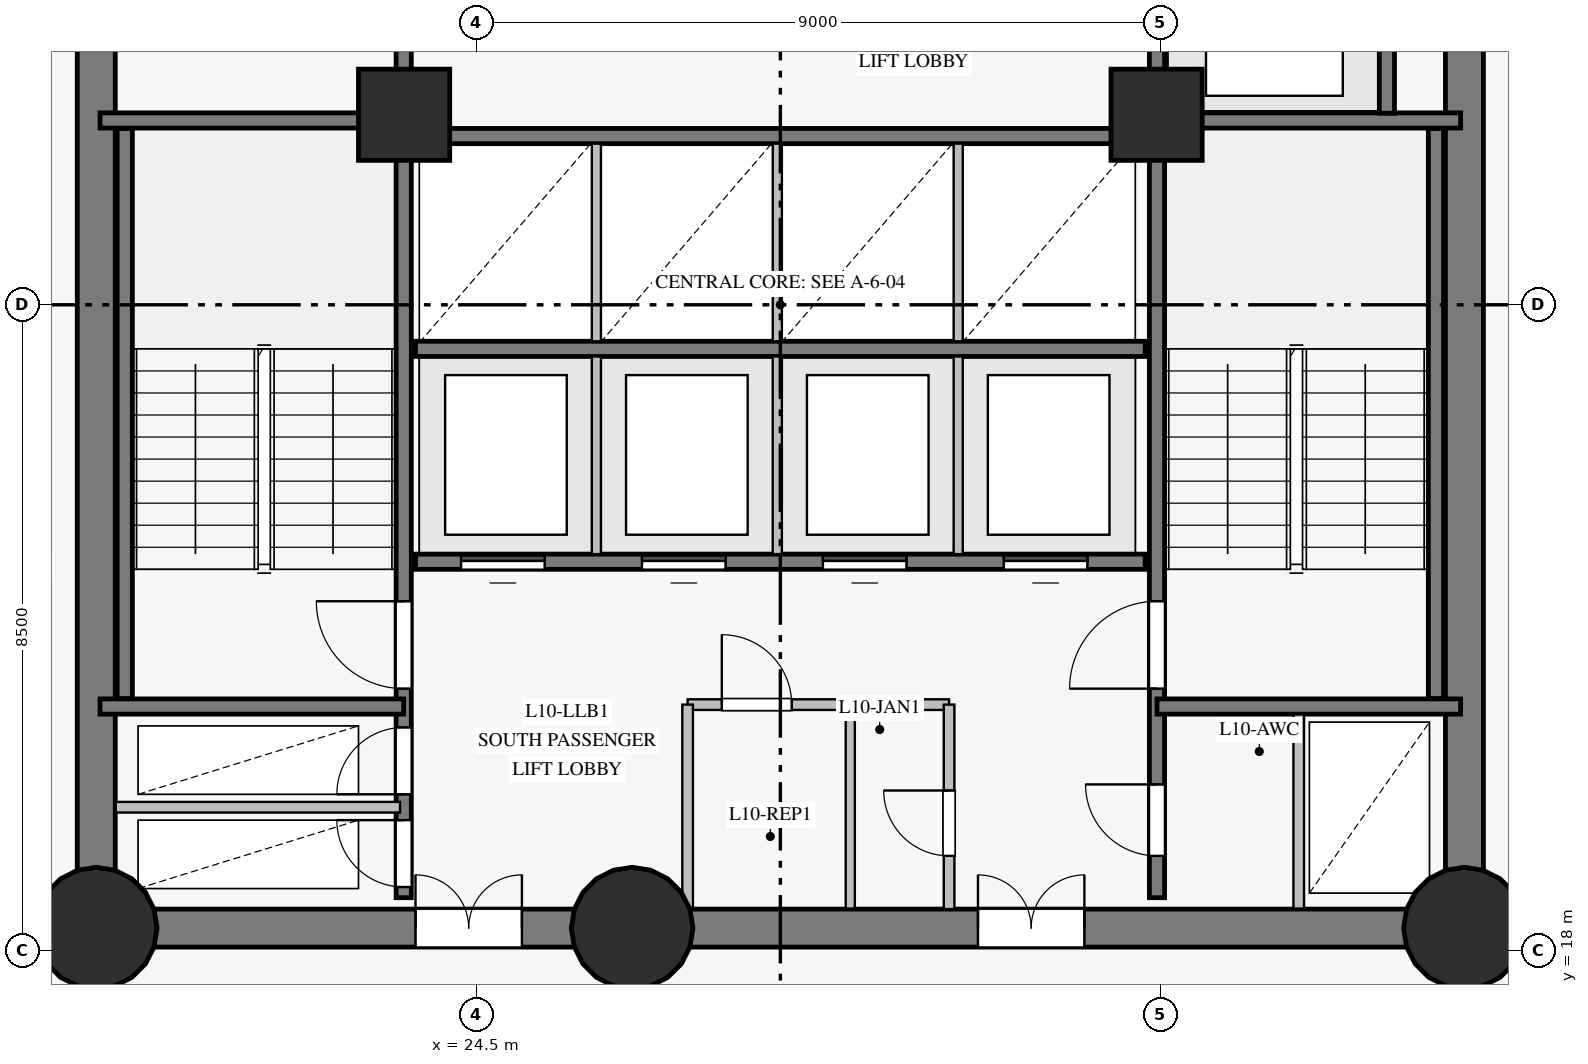
"""IFC4 building model, lengths in metres.
Left out: names, types, materials, properties, quantities, classifications, styles, units other than length and angle.
Written with IfcOpenShell. Run it as: python <this file> out.ifc"""

import sys

from ifc_helpers import new_model, si_unit, direction, frame, frame_2d, origin, origin_with_axes, origin_2d, place, context, subcontext, project, spatial, rectangle, circle, extrude, source, transform, mapped, element, fill, save


model = new_model("IFC4")
c1 = context("Model", 3, precision=1e-05, world=origin(), true_north=direction((0.0, 1.0)))
c2 = subcontext(c1, "Body", "Model", "MODEL_VIEW")
j1 = project(units=[si_unit("LENGTHUNIT", "METRE"), si_unit("PLANEANGLEUNIT", "RADIAN")], contexts=[c1])
p1 = place(None, origin())
s1 = spatial("IfcSite", under=j1, at=p1, CompositionType="ELEMENT")
p2 = place(p1, origin())
s2 = spatial("IfcBuilding", under=s1, at=p2, CompositionType="ELEMENT")
p3 = place(p2, frame((0.0, 0.0, 40.9)))
s3 = spatial("IfcBuildingStorey", under=s2, at=p3, CompositionType="ELEMENT", Elevation=40.9)
p4 = place(p3, frame((19.5, 18.3, 0.0), z_axis=(0.0, 0.0, 1.0), x_axis=(1.0, 0.0, 0.0)))
e1 = element("IfcWall", 1, at=p4, inside=s3, PredefinedType="SHEAR", context=c2, shape_type="SweptSolid", body=[
    extrude(rectangle(XDim=7.05, YDim=0.5, at=frame_2d((3.525, 0.0))), origin(), (0.0, 0.0, 1.0), 3.35),
])
p5 = place(p4, frame((4.2, 0.0, 0.0)))
e2 = element("IfcOpeningElement", 2, at=p5, cuts=e1, PredefinedType="OPENING", context=c2, shape_type="SweptSolid", body=[
    extrude(rectangle(XDim=1.4, YDim=2.2, at=frame_2d((0.7, 1.1))), frame((0.0, 0.26, 0.0), z_axis=(0.0, -1.0, 0.0), x_axis=(1.0, 0.0, 0.0)), (0.0, 0.0, 1.0), 0.52),
])
p6 = place(p3, frame((26.55, 18.3, 0.0), z_axis=(0.0, 0.0, 1.0), x_axis=(1.0, 0.0, 0.0)))
e3 = element("IfcWall", 3, at=p6, inside=s3, PredefinedType="SHEAR", context=c2, shape_type="SweptSolid", body=[
    extrude(rectangle(XDim=10.95, YDim=0.5, at=frame_2d((5.475, 0.0))), origin(), (0.0, 0.0, 1.0), 3.35),
])
p7 = place(p6, frame((4.55, 0.0, 0.0)))
e4 = element("IfcOpeningElement", 4, at=p7, cuts=e3, PredefinedType="OPENING", context=c2, shape_type="SweptSolid", body=[
    extrude(rectangle(XDim=1.4, YDim=2.2, at=frame_2d((0.7, 1.1))), frame((0.0, 0.26, 0.0), z_axis=(0.0, -1.0, 0.0), x_axis=(1.0, 0.0, 0.0)), (0.0, 0.0, 1.0), 0.52),
])
p8 = place(p3, frame((37.5, 18.3, 0.0), z_axis=(0.0, 0.0, 1.0), x_axis=(0.0, 1.0, 0.0)))
e5 = element("IfcWall", 5, at=p8, inside=s3, PredefinedType="SHEAR", context=c2, shape_type="SweptSolid", body=[
    extrude(rectangle(XDim=16.4, YDim=0.5, at=frame_2d((8.2, 0.0))), origin(), (0.0, 0.0, 1.0), 3.35),
])
p9 = place(p8, frame((14.06, 0.0, 0.0)))
e6 = element("IfcOpeningElement", 6, at=p9, cuts=e5, PredefinedType="OPENING", context=c2, shape_type="SweptSolid", body=[
    extrude(rectangle(XDim=1.2, YDim=2.15, at=frame_2d((0.6, 1.075))), frame((0.0, 0.26, 0.0), z_axis=(0.0, -1.0, 0.0), x_axis=(1.0, 0.0, 0.0)), (0.0, 0.0, 1.0), 0.52),
])
p10 = place(p3, frame((19.5, 34.7, 0.0), z_axis=(0.0, 0.0, 1.0), x_axis=(0.0, -1.0, 0.0)))
e7 = element("IfcWall", 7, at=p10, inside=s3, PredefinedType="SHEAR", context=c2, shape_type="SweptSolid", body=[
    extrude(rectangle(XDim=16.4, YDim=0.5, at=frame_2d((8.2, 0.0))), origin(), (0.0, 0.0, 1.0), 3.35),
])
p11 = place(p10, frame((3.1, 0.0, 0.0)))
e8 = element("IfcOpeningElement", 8, at=p11, cuts=e7, PredefinedType="OPENING", context=c2, shape_type="SweptSolid", body=[
    extrude(rectangle(XDim=1.1, YDim=2.15, at=frame_2d((0.55, 1.075))), frame((0.0, 0.26, 0.0), z_axis=(0.0, -1.0, 0.0), x_axis=(1.0, 0.0, 0.0)), (0.0, 0.0, 1.0), 0.52),
])
m1 = source(origin_with_axes(), c2, "Body", "SweptSolid", [
    extrude(circle(Radius=0.8, at=origin_2d()), origin(), (0.0, 0.0, 1.0), 3.6),
])
for number, where, z_axis, x_axis in (
    (9, (19.5, 18.3, 0.0), (0.0, 0.0, 1.0), (1.0, 0.0, 0.0)),
    (10, (26.55, 18.3, 0.0), (0.0, 0.0, 1.0), (1.0, 0.0, 0.0)),
    (11, (37.5, 18.3, 0.0), (0.0, 0.0, 1.0), (1.0, 0.0, 0.0)),
):
    element("IfcColumn", number, at=place(p3, frame(where, z_axis=z_axis, x_axis=x_axis)), inside=s3, PredefinedType="COLUMN", context=c2, shape_type="MappedRepresentation", body=[
        mapped(m1, transform((0.0, 0.0, 0.0), scale=1.0)),
    ])
m2 = source(origin_with_axes(), c2, "Body", "SweptSolid", [
    extrude(rectangle(XDim=1.2, YDim=1.2, at=origin_2d()), origin(), (0.0, 0.0, 1.0), 3.6),
])
for number, where, z_axis, x_axis in (
    (12, (23.55, 29.0, 0.0), (0.0, 0.0, 1.0), (1.0, 0.0, 0.0)),
    (13, (33.45, 29.0, 0.0), (0.0, 0.0, 1.0), (1.0, 0.0, 0.0)),
):
    element("IfcColumn", number, at=place(p3, frame(where, z_axis=z_axis, x_axis=x_axis)), inside=s3, PredefinedType="COLUMN", context=c2, shape_type="MappedRepresentation", body=[
        mapped(m2, transform((0.0, 0.0, 0.0), scale=1.0)),
    ])
p12 = place(p3, frame((23.545, 18.7, 0.0), z_axis=(0.0, 0.0, 1.0), x_axis=(0.0, 1.0, 0.0)))
e14 = element("IfcWall", 14, at=p12, inside=s3, PredefinedType="SHEAR", context=c2, shape_type="SweptSolid", body=[
    extrude(rectangle(XDim=15.6, YDim=0.2, at=frame_2d((7.8, 0.0))), origin(), (0.0, 0.0, 1.0), 3.35),
])
p13 = place(p12, frame((2.75, 0.0, 0.0)))
e15 = element("IfcOpeningElement", 15, at=p13, cuts=e14, PredefinedType="OPENING", context=c2, shape_type="SweptSolid", body=[
    extrude(rectangle(XDim=1.15, YDim=2.15, at=frame_2d((0.575, 1.075))), frame((0.0, 0.11, 0.0), z_axis=(0.0, -1.0, 0.0), x_axis=(1.0, 0.0, 0.0)), (0.0, 0.0, 1.0), 0.22),
])
p14 = place(p12, frame((0.14, 0.0, 0.0)))
e16 = element("IfcOpeningElement", 16, at=p14, cuts=e14, PredefinedType="OPENING", context=c2, shape_type="SweptSolid", body=[
    extrude(rectangle(XDim=0.88, YDim=2.1, at=frame_2d((0.44, 1.05))), frame((0.0, 0.11, 0.0), z_axis=(0.0, -1.0, 0.0), x_axis=(1.0, 0.0, 0.0)), (0.0, 0.0, 1.0), 0.22),
])
p15 = place(p12, frame((1.36, 0.0, 0.0)))
e17 = element("IfcOpeningElement", 17, at=p15, cuts=e14, PredefinedType="OPENING", context=c2, shape_type="SweptSolid", body=[
    extrude(rectangle(XDim=0.88, YDim=2.1, at=frame_2d((0.44, 1.05))), frame((0.0, 0.11, 0.0), z_axis=(0.0, -1.0, 0.0), x_axis=(1.0, 0.0, 0.0)), (0.0, 0.0, 1.0), 0.22),
])
p16 = place(p12, frame((12.1, 0.0, 0.0)))
e18 = element("IfcOpeningElement", 18, at=p16, cuts=e14, PredefinedType="OPENING", context=c2, shape_type="SweptSolid", body=[
    extrude(rectangle(XDim=1.12, YDim=2.15, at=frame_2d((0.56, 1.075))), frame((0.0, 0.11, 0.0), z_axis=(0.0, -1.0, 0.0), x_axis=(1.0, 0.0, 0.0)), (0.0, 0.0, 1.0), 0.22),
])
p17 = place(p12, frame((14.05, 0.0, 0.0)))
e19 = element("IfcOpeningElement", 19, at=p17, cuts=e14, PredefinedType="OPENING", context=c2, shape_type="SweptSolid", body=[
    extrude(rectangle(XDim=1.12, YDim=2.15, at=frame_2d((0.56, 1.075))), frame((0.0, 0.11, 0.0), z_axis=(0.0, -1.0, 0.0), x_axis=(1.0, 0.0, 0.0)), (0.0, 0.0, 1.0), 0.22),
])
p18 = place(p3, frame((33.455, 18.7, 0.0), z_axis=(0.0, 0.0, 1.0), x_axis=(0.0, 1.0, 0.0)))
e20 = element("IfcWall", 20, at=p18, inside=s3, PredefinedType="SHEAR", context=c2, shape_type="SweptSolid", body=[
    extrude(rectangle(XDim=15.6, YDim=0.2, at=frame_2d((7.8, 0.0))), origin(), (0.0, 0.0, 1.0), 3.35),
])
p19 = place(p18, frame((2.75, 0.0, 0.0)))
e21 = element("IfcOpeningElement", 21, at=p19, cuts=e20, PredefinedType="OPENING", context=c2, shape_type="SweptSolid", body=[
    extrude(rectangle(XDim=1.15, YDim=2.15, at=frame_2d((0.575, 1.075))), frame((0.0, 0.11, 0.0), z_axis=(0.0, -1.0, 0.0), x_axis=(1.0, 0.0, 0.0)), (0.0, 0.0, 1.0), 0.22),
])
p20 = place(p18, frame((0.55, 0.0, 0.0)))
e22 = element("IfcOpeningElement", 22, at=p20, cuts=e20, PredefinedType="OPENING", context=c2, shape_type="SweptSolid", body=[
    extrude(rectangle(XDim=0.94, YDim=2.1, at=frame_2d((0.47, 1.05))), frame((0.0, 0.11, 0.0), z_axis=(0.0, -1.0, 0.0), x_axis=(1.0, 0.0, 0.0)), (0.0, 0.0, 1.0), 0.22),
])
p21 = place(p3, frame((23.7, 23.12, 0.0), z_axis=(0.0, 0.0, 1.0), x_axis=(1.0, 0.0, 0.0)))
e23 = element("IfcWall", 23, at=p21, inside=s3, PredefinedType="SHEAR", context=c2, shape_type="SweptSolid", body=[
    extrude(rectangle(XDim=9.6, YDim=0.2, at=frame_2d((4.8, 0.0))), origin(), (0.0, 0.0, 1.0), 3.35),
])
p22 = place(p21, frame((0.6, 0.0, 0.0)))
e24 = element("IfcOpeningElement", 24, at=p22, cuts=e23, PredefinedType="OPENING", context=c2, shape_type="SweptSolid", body=[
    extrude(rectangle(XDim=1.1, YDim=2.15, at=frame_2d((0.55, 1.075))), frame((0.0, 0.11, 0.0), z_axis=(0.0, -1.0, 0.0), x_axis=(1.0, 0.0, 0.0)), (0.0, 0.0, 1.0), 0.22),
])
p23 = place(p21, frame((2.98, 0.0, 0.0)))
e25 = element("IfcOpeningElement", 25, at=p23, cuts=e23, PredefinedType="OPENING", context=c2, shape_type="SweptSolid", body=[
    extrude(rectangle(XDim=1.1, YDim=2.15, at=frame_2d((0.55, 1.075))), frame((0.0, 0.11, 0.0), z_axis=(0.0, -1.0, 0.0), x_axis=(1.0, 0.0, 0.0)), (0.0, 0.0, 1.0), 0.22),
])
p24 = place(p21, frame((5.36, 0.0, 0.0)))
e26 = element("IfcOpeningElement", 26, at=p24, cuts=e23, PredefinedType="OPENING", context=c2, shape_type="SweptSolid", body=[
    extrude(rectangle(XDim=1.1, YDim=2.15, at=frame_2d((0.55, 1.075))), frame((0.0, 0.11, 0.0), z_axis=(0.0, -1.0, 0.0), x_axis=(1.0, 0.0, 0.0)), (0.0, 0.0, 1.0), 0.22),
])
p25 = place(p21, frame((7.74, 0.0, 0.0)))
e27 = element("IfcOpeningElement", 27, at=p25, cuts=e23, PredefinedType="OPENING", context=c2, shape_type="SweptSolid", body=[
    extrude(rectangle(XDim=1.1, YDim=2.15, at=frame_2d((0.55, 1.075))), frame((0.0, 0.11, 0.0), z_axis=(0.0, -1.0, 0.0), x_axis=(1.0, 0.0, 0.0)), (0.0, 0.0, 1.0), 0.22),
])
for number, where, z_axis, x_axis in (
    (28, (23.7, 25.92, 0.0), (0.0, 0.0, 1.0), (1.0, 0.0, 0.0)),
    (29, (23.7, 28.72, 0.0), (0.0, 0.0, 1.0), (1.0, 0.0, 0.0)),
):
    element("IfcWall", number, at=place(p3, frame(where, z_axis=z_axis, x_axis=x_axis)), inside=s3, PredefinedType="SHEAR", context=c2, shape_type="SweptSolid", body=[
        extrude(rectangle(XDim=9.6, YDim=0.2, at=frame_2d((4.8, 0.0))), origin(), (0.0, 0.0, 1.0), 3.35),
    ])
for number, where, z_axis, x_axis in (
    (30, (19.875, 21.32, 0.0), (0.0, 0.0, 1.0), (0.0, 1.0, 0.0)),
    (31, (37.125, 21.32, 0.0), (0.0, 0.0, 1.0), (0.0, 1.0, 0.0)),
):
    element("IfcWall", number, at=place(p3, frame(where, z_axis=z_axis, x_axis=x_axis)), inside=s3, PredefinedType="SHEAR", context=c2, shape_type="SweptSolid", body=[
        extrude(rectangle(XDim=7.5, YDim=0.2, at=frame_2d((3.75, 0.0))), origin(), (0.0, 0.0, 1.0), 3.35),
    ])
for number, where, z_axis, x_axis in (
    (32, (33.455, 21.215, 0.0), (0.0, 0.0, 1.0), (1.0, 0.0, 0.0)),
    (33, (33.455, 28.925, 0.0), (0.0, 0.0, 1.0), (1.0, 0.0, 0.0)),
    (34, (19.55, 21.215, 0.0), (0.0, 0.0, 1.0), (1.0, 0.0, 0.0)),
    (35, (19.55, 28.925, 0.0), (0.0, 0.0, 1.0), (1.0, 0.0, 0.0)),
):
    element("IfcWall", number, at=place(p3, frame(where, z_axis=z_axis, x_axis=x_axis)), inside=s3, PredefinedType="SHEAR", context=c2, shape_type="SweptSolid", body=[
        extrude(rectangle(XDim=3.995, YDim=0.2, at=frame_2d((1.998, 0.0))), origin(), (0.0, 0.0, 1.0), 3.35),
    ])
p26 = place(p3, frame((36.48, 29.02, 0.0), z_axis=(0.0, 0.0, 1.0), x_axis=(0.0, 1.0, 0.0)))
e36 = element("IfcWall", 36, at=p26, inside=s3, PredefinedType="SHEAR", context=c2, shape_type="SweptSolid", body=[
    extrude(rectangle(XDim=2.86, YDim=0.2, at=frame_2d((1.43, 0.0))), origin(), (0.0, 0.0, 1.0), 3.35),
])
p27 = place(p3, frame((19.757, 19.89, 0.0), z_axis=(0.0, 0.0, 1.0), x_axis=(1.0, 0.0, 0.0)))
e37 = element("IfcWall", 37, at=p27, inside=s3, PredefinedType="PARTITIONING", context=c2, shape_type="SweptSolid", body=[
    extrude(rectangle(XDim=3.739, YDim=0.14, at=frame_2d((1.87, 0.0))), origin(), (0.0, 0.0, 1.0), 3.35),
])
p28 = place(p3, frame((27.28, 21.24, 0.0), z_axis=(0.0, 0.0, 1.0), x_axis=(1.0, 0.0, 0.0)))
e38 = element("IfcWall", 38, at=p28, inside=s3, PredefinedType="PARTITIONING", context=c2, shape_type="SweptSolid", body=[
    extrude(rectangle(XDim=3.44, YDim=0.14, at=frame_2d((1.72, 0.0))), origin(), (0.0, 0.0, 1.0), 3.35),
])
p29 = place(p28, frame((0.45, 0.0, 0.0)))
e39 = element("IfcOpeningElement", 39, at=p29, cuts=e38, PredefinedType="OPENING", context=c2, shape_type="SweptSolid", body=[
    extrude(rectangle(XDim=0.92, YDim=2.1, at=frame_2d((0.46, 1.05))), frame((0.0, 0.08, 0.0), z_axis=(0.0, -1.0, 0.0), x_axis=(1.0, 0.0, 0.0)), (0.0, 0.0, 1.0), 0.16),
])
p30 = place(p3, frame((27.28, 18.55, 0.0), z_axis=(0.0, 0.0, 1.0), x_axis=(0.0, 1.0, 0.0)))
e40 = element("IfcWall", 40, at=p30, inside=s3, PredefinedType="PARTITIONING", context=c2, shape_type="SweptSolid", body=[
    extrude(rectangle(XDim=2.69, YDim=0.14, at=frame_2d((1.345, 0.0))), origin(), (0.0, 0.0, 1.0), 3.35),
])
p31 = place(p3, frame((30.72, 18.55, 0.0), z_axis=(0.0, 0.0, 1.0), x_axis=(0.0, 1.0, 0.0)))
e41 = element("IfcWall", 41, at=p31, inside=s3, PredefinedType="PARTITIONING", context=c2, shape_type="SweptSolid", body=[
    extrude(rectangle(XDim=2.69, YDim=0.14, at=frame_2d((1.345, 0.0))), origin(), (0.0, 0.0, 1.0), 3.35),
])
p32 = place(p31, frame((0.7, 0.0, 0.0)))
e42 = element("IfcOpeningElement", 42, at=p32, cuts=e41, PredefinedType="OPENING", context=c2, shape_type="SweptSolid", body=[
    extrude(rectangle(XDim=0.86, YDim=2.1, at=frame_2d((0.43, 1.05))), frame((0.0, 0.08, 0.0), z_axis=(0.0, -1.0, 0.0), x_axis=(1.0, 0.0, 0.0)), (0.0, 0.0, 1.0), 0.16),
])
for number, where, z_axis, x_axis in (
    (43, (26.08, 23.22, 0.0), (0.0, 0.0, 1.0), (0.0, 1.0, 0.0)),
    (44, (28.46, 23.22, 0.0), (0.0, 0.0, 1.0), (0.0, 1.0, 0.0)),
    (45, (30.84, 23.22, 0.0), (0.0, 0.0, 1.0), (0.0, 1.0, 0.0)),
    (46, (26.08, 26.02, 0.0), (0.0, 0.0, 1.0), (0.0, 1.0, 0.0)),
    (47, (28.46, 26.02, 0.0), (0.0, 0.0, 1.0), (0.0, 1.0, 0.0)),
    (48, (30.84, 26.02, 0.0), (0.0, 0.0, 1.0), (0.0, 1.0, 0.0)),
):
    element("IfcWall", number, at=place(p3, frame(where, z_axis=z_axis, x_axis=x_axis)), inside=s3, PredefinedType="PARTITIONING", context=c2, shape_type="SweptSolid", body=[
        extrude(rectangle(XDim=2.6, YDim=0.12, at=frame_2d((1.3, 0.0))), origin(), (0.0, 0.0, 1.0), 3.35),
    ])
p33 = place(p3, frame((29.42, 18.557, 0.0), z_axis=(0.0, 0.0, 1.0), x_axis=(0.0, 1.0, 0.0)))
e49 = element("IfcWall", 49, at=p33, inside=s3, PredefinedType="PARTITIONING", context=c2, shape_type="SweptSolid", body=[
    extrude(rectangle(XDim=2.611, YDim=0.12, at=frame_2d((1.306, 0.0))), origin(), (0.0, 0.0, 1.0), 3.35),
])
p34 = place(p3, frame((35.32, 18.557, 0.0), z_axis=(0.0, 0.0, 1.0), x_axis=(0.0, 1.0, 0.0)))
e50 = element("IfcWall", 50, at=p34, inside=s3, PredefinedType="PARTITIONING", context=c2, shape_type="SweptSolid", body=[
    extrude(rectangle(XDim=2.553, YDim=0.14, at=frame_2d((1.277, 0.0))), origin(), (0.0, 0.0, 1.0), 3.35),
])
m3 = source(origin_with_axes(), c2, "Body", "SweptSolid", [
    extrude(rectangle(XDim=1.15, YDim=2.15, at=frame_2d((0.575, 1.075))), frame((0.0, 0.025, 0.0), z_axis=(0.0, -1.0, 0.0), x_axis=(1.0, 0.0, 0.0)), (0.0, 0.0, 1.0), 0.05),
])
p35 = place(p13, origin())
e51 = element("IfcDoor", 51, at=p35, inside=s3, OperationType="SINGLE_SWING_RIGHT", PredefinedType="DOOR", context=c2, shape_type="MappedRepresentation", body=[
    mapped(m3, transform((0.0, 0.0, 0.0), scale=1.0)),
])
fill(e15, e51)
p36 = place(p19, origin())
e52 = element("IfcDoor", 52, at=p36, inside=s3, OperationType="SINGLE_SWING_LEFT", PredefinedType="DOOR", context=c2, shape_type="MappedRepresentation", body=[
    mapped(m3, transform((0.0, 0.0, 0.0), scale=1.0)),
])
fill(e21, e52)
m4 = source(origin_with_axes(), c2, "Body", "SweptSolid", [
    extrude(rectangle(XDim=0.88, YDim=2.1, at=frame_2d((0.44, 1.05))), frame((0.0, 0.025, 0.0), z_axis=(0.0, -1.0, 0.0), x_axis=(1.0, 0.0, 0.0)), (0.0, 0.0, 1.0), 0.05),
])
p37 = place(p14, origin())
e53 = element("IfcDoor", 53, at=p37, inside=s3, OperationType="SINGLE_SWING_RIGHT", PredefinedType="DOOR", context=c2, shape_type="MappedRepresentation", body=[
    mapped(m4, transform((0.0, 0.0, 0.0), scale=1.0)),
])
fill(e16, e53)
p38 = place(p15, origin())
e54 = element("IfcDoor", 54, at=p38, inside=s3, OperationType="SINGLE_SWING_LEFT", PredefinedType="DOOR", context=c2, shape_type="MappedRepresentation", body=[
    mapped(m4, transform((0.0, 0.0, 0.0), scale=1.0)),
])
fill(e17, e54)
m5 = source(origin_with_axes(), c2, "Body", "SweptSolid", [
    extrude(rectangle(XDim=1.4, YDim=2.2, at=frame_2d((0.7, 1.1))), frame((0.0, 0.025, 0.0), z_axis=(0.0, -1.0, 0.0), x_axis=(1.0, 0.0, 0.0)), (0.0, 0.0, 1.0), 0.05),
])
p39 = place(p5, origin())
e55 = element("IfcDoor", 55, at=p39, inside=s3, OperationType="DOUBLE_DOOR_SINGLE_SWING", PredefinedType="DOOR", context=c2, shape_type="MappedRepresentation", body=[
    mapped(m5, transform((0.0, 0.0, 0.0), scale=1.0)),
])
fill(e2, e55)
p40 = place(p7, origin())
e56 = element("IfcDoor", 56, at=p40, inside=s3, OperationType="DOUBLE_DOOR_SINGLE_SWING", PredefinedType="DOOR", context=c2, shape_type="MappedRepresentation", body=[
    mapped(m5, transform((0.0, 0.0, 0.0), scale=1.0)),
])
fill(e4, e56)
m6 = source(origin_with_axes(), c2, "Body", "SweptSolid", [
    extrude(rectangle(XDim=0.94, YDim=2.1, at=frame_2d((0.47, 1.05))), frame((0.0, 0.025, 0.0), z_axis=(0.0, -1.0, 0.0), x_axis=(1.0, 0.0, 0.0)), (0.0, 0.0, 1.0), 0.05),
])
p41 = place(p20, origin())
e57 = element("IfcDoor", 57, at=p41, inside=s3, OperationType="SINGLE_SWING_RIGHT", PredefinedType="DOOR", context=c2, shape_type="MappedRepresentation", body=[
    mapped(m6, transform((0.0, 0.0, 0.0), scale=1.0)),
])
fill(e22, e57)
m7 = source(origin_with_axes(), c2, "Body", "SweptSolid", [
    extrude(rectangle(XDim=0.92, YDim=2.1, at=frame_2d((0.46, 1.05))), frame((0.0, 0.025, 0.0), z_axis=(0.0, -1.0, 0.0), x_axis=(1.0, 0.0, 0.0)), (0.0, 0.0, 1.0), 0.05),
])
p42 = place(p29, origin())
e58 = element("IfcDoor", 58, at=p42, inside=s3, OperationType="SINGLE_SWING_LEFT", PredefinedType="DOOR", context=c2, shape_type="MappedRepresentation", body=[
    mapped(m7, transform((0.0, 0.0, 0.0), scale=1.0)),
])
fill(e39, e58)
m8 = source(origin_with_axes(), c2, "Body", "SweptSolid", [
    extrude(rectangle(XDim=0.86, YDim=2.1, at=frame_2d((0.43, 1.05))), frame((0.0, 0.025, 0.0), z_axis=(0.0, -1.0, 0.0), x_axis=(1.0, 0.0, 0.0)), (0.0, 0.0, 1.0), 0.05),
])
p43 = place(p32, origin())
e59 = element("IfcDoor", 59, at=p43, inside=s3, OperationType="SINGLE_SWING_RIGHT", PredefinedType="DOOR", context=c2, shape_type="MappedRepresentation", body=[
    mapped(m8, transform((0.0, 0.0, 0.0), scale=1.0)),
])
fill(e42, e59)
m9 = source(origin_with_axes(), c2, "Body", "SweptSolid", [
    extrude(rectangle(XDim=1.1, YDim=2.15, at=frame_2d((0.55, 1.075))), frame((0.0, 0.025, 0.0), z_axis=(0.0, -1.0, 0.0), x_axis=(1.0, 0.0, 0.0)), (0.0, 0.0, 1.0), 0.05),
])
p44 = place(p22, origin())
e60 = element("IfcDoor", 60, at=p44, inside=s3, OperationType="SLIDING_TO_LEFT", PredefinedType="DOOR", context=c2, shape_type="MappedRepresentation", body=[
    mapped(m9, transform((0.0, 0.0, 0.0), scale=1.0)),
])
fill(e24, e60)
p45 = place(p23, origin())
e61 = element("IfcDoor", 61, at=p45, inside=s3, OperationType="SLIDING_TO_RIGHT", PredefinedType="DOOR", context=c2, shape_type="MappedRepresentation", body=[
    mapped(m9, transform((0.0, 0.0, 0.0), scale=1.0)),
])
fill(e25, e61)
p46 = place(p24, origin())
e62 = element("IfcDoor", 62, at=p46, inside=s3, OperationType="SLIDING_TO_LEFT", PredefinedType="DOOR", context=c2, shape_type="MappedRepresentation", body=[
    mapped(m9, transform((0.0, 0.0, 0.0), scale=1.0)),
])
fill(e26, e62)
p47 = place(p25, origin())
e63 = element("IfcDoor", 63, at=p47, inside=s3, OperationType="SLIDING_TO_RIGHT", PredefinedType="DOOR", context=c2, shape_type="MappedRepresentation", body=[
    mapped(m9, transform((0.0, 0.0, 0.0), scale=1.0)),
])
fill(e27, e63)
save(model, sys.argv[1])
